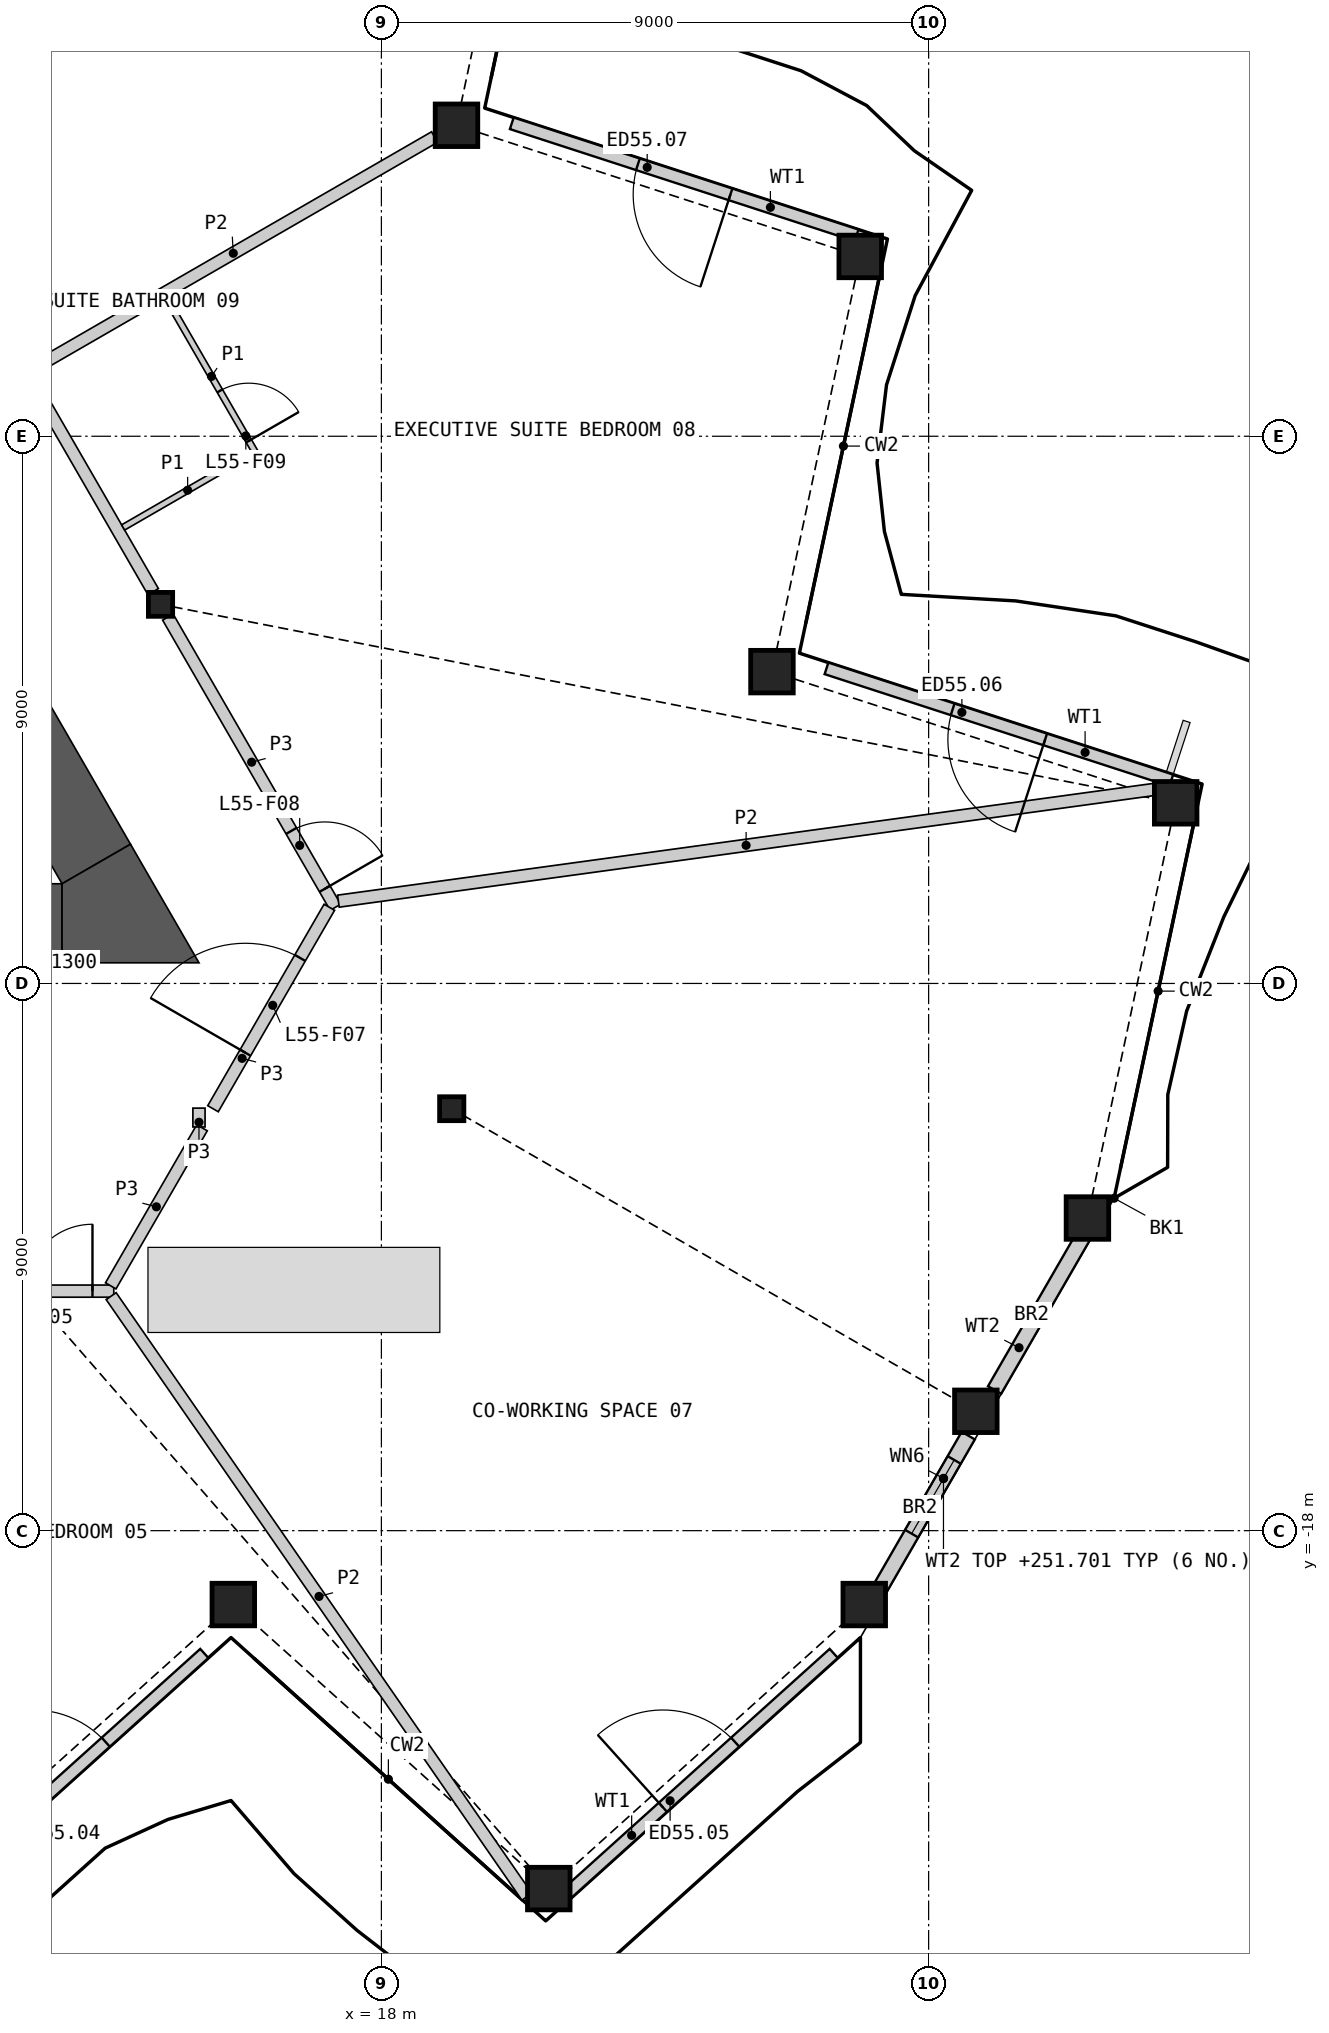
"""IFC4 building model, lengths in metres.
Left out: names, types, materials, properties, quantities, classifications, styles, units other than length and angle.
Written with IfcOpenShell. Run it as: python <this file> out.ifc"""

import sys

from ifc_helpers import new_model, si_unit, direction, frame, frame_2d, origin, origin_2d, place, context, subcontext, project, spatial, polyline, rectangle, hollow_rectangle, i_section, outline, extrude, element, fill, save


model = new_model("IFC4")
c1 = context("Model", 3, precision=1e-05, world=origin(), true_north=direction((0.0, 1.0)))
c2 = subcontext(c1, "Body", "Model", "MODEL_VIEW")
j1 = project(units=[si_unit("LENGTHUNIT", "METRE"), si_unit("PLANEANGLEUNIT", "RADIAN")], contexts=[c1])
p1 = place(None, origin())
s1 = spatial("IfcSite", under=j1, at=p1, CompositionType="ELEMENT")
p2 = place(p1, origin())
s2 = spatial("IfcBuilding", under=s1, at=p2, CompositionType="ELEMENT")
p3 = place(p2, frame((0.0, 0.0, 249.0)))
s3 = spatial("IfcBuildingStorey", under=s2, at=p3, CompositionType="ELEMENT", Elevation=249.0)
for number, where, z_axis, x_axis in (
    (1, (15.565, -19.215, 0.0), (0.0, 0.0, 1.0), (1.0, 0.0, 0.0)),
    (2, (20.753, -23.887, 0.0), (0.0, 0.0, 1.0), (1.0, 0.0, 0.0)),
    (3, (25.941, -19.215, 0.0), (0.0, 0.0, 1.0), (1.0, 0.0, 0.0)),
    (4, (27.776, -16.037, 0.0), (0.0, 0.0, 1.0), (1.0, 0.0, 0.0)),
    (5, (29.612, -12.858, 0.0), (0.0, 0.0, 1.0), (1.0, 0.0, 0.0)),
    (6, (31.063, -6.029, 0.0), (0.0, 0.0, 1.0), (1.0, 0.0, 0.0)),
    (7, (24.423, -3.872, 0.0), (0.0, 0.0, 1.0), (1.0, 0.0, 0.0)),
    (8, (25.875, 2.957, 0.0), (0.0, 0.0, 1.0), (1.0, 0.0, 0.0)),
    (9, (19.235, 5.115, 0.0), (0.0, 0.0, 1.0), (1.0, 0.0, 0.0)),
):
    element("IfcColumn", number, at=place(p3, frame(where, z_axis=z_axis, x_axis=x_axis)), inside=s3, PredefinedType="COLUMN", context=c2, shape_type="SweptSolid", body=[
        extrude(hollow_rectangle(XDim=0.7, YDim=0.7, WallThickness=0.045, at=origin_2d()), origin(), (0.0, 0.0, 1.0), 3.6),
    ])
for number, where, z_axis, x_axis in (
    (10, (19.157, -11.06, 0.0), (0.0, 0.0, 1.0), (1.0, 0.0, 0.0)),
    (11, (14.368, -2.765, 0.0), (0.0, 0.0, 1.0), (1.0, 0.0, 0.0)),
):
    element("IfcColumn", number, at=place(p3, frame(where, z_axis=z_axis, x_axis=x_axis)), inside=s3, PredefinedType="COLUMN", context=c2, shape_type="SweptSolid", body=[
        extrude(i_section(OverallWidth=0.399, OverallDepth=0.393, WebThickness=0.023, FlangeThickness=0.037, at=origin_2d()), origin(), (0.0, 0.0, 1.0), 3.6),
    ])
p4 = place(p3, frame((10.657, -24.009, 0.0), z_axis=(0.0, 0.0, 1.0), x_axis=(0.74315161366, 0.669123067241, 0.0)))
e12 = element("IfcWall", 12, at=p4, inside=s3, PredefinedType="SOLIDWALL", context=c2, shape_type="SweptSolid", body=[
    extrude(rectangle(XDim=5.963, YDim=0.2, at=frame_2d((2.981, 0.0))), origin(), (0.0, 0.0, 1.0), 2.701),
])
p5 = place(p4, frame((2.181, 0.0, 0.0)))
e13 = element("IfcOpeningElement", 13, at=p5, cuts=e12, PredefinedType="OPENING", context=c2, shape_type="SweptSolid", body=[
    extrude(rectangle(XDim=1.6, YDim=2.4, at=frame_2d((0.8, 1.2))), frame((0.0, 0.11, 0.0), z_axis=(0.0, -1.0, 0.0), x_axis=(1.0, 0.0, 0.0)), (0.0, 0.0, 1.0), 0.22),
])
p6 = place(p3, frame((21.008, -24.009, 0.0), z_axis=(0.0, 0.0, 1.0), x_axis=(0.743133280699, 0.669143427912, 0.0)))
e14 = element("IfcWall", 14, at=p6, inside=s3, PredefinedType="SOLIDWALL", context=c2, shape_type="SweptSolid", body=[
    extrude(rectangle(XDim=5.962, YDim=0.2, at=frame_2d((2.981, 0.0))), origin(), (0.0, 0.0, 1.0), 2.701),
])
p7 = place(p6, frame((2.181, 0.0, 0.0)))
e15 = element("IfcOpeningElement", 15, at=p7, cuts=e14, PredefinedType="OPENING", context=c2, shape_type="SweptSolid", body=[
    extrude(rectangle(XDim=1.6, YDim=2.4, at=frame_2d((0.8, 1.2))), frame((0.0, 0.11, 0.0), z_axis=(0.0, -1.0, 0.0), x_axis=(1.0, 0.0, 0.0)), (0.0, 0.0, 1.0), 0.22),
])
p8 = place(p3, frame((26.021, -19.262, 0.0), z_axis=(0.0, 0.0, 1.0), x_axis=(0.500026945261, 0.866009846372, 0.0)))
e16 = element("IfcWall", 16, at=p8, inside=s3, PredefinedType="SOLIDWALL", context=c2, shape_type="SweptSolid", body=[
    extrude(rectangle(XDim=3.262, YDim=0.25, at=frame_2d((1.631, 0.0))), origin(), (0.0, 0.0, 1.0), 2.701),
])
p9 = place(p8, frame((1.4, 0.0, 1.9)))
e17 = element("IfcOpeningElement", 17, at=p9, cuts=e16, PredefinedType="OPENING", context=c2, shape_type="SweptSolid", body=[
    extrude(rectangle(XDim=1.4, YDim=0.6, at=frame_2d((0.7, 0.3))), frame((0.0, 0.135, 0.0), z_axis=(0.0, -1.0, 0.0), x_axis=(1.0, 0.0, 0.0)), (0.0, 0.0, 1.0), 0.27),
])
p10 = place(p3, frame((28.085, -15.687, 0.0), z_axis=(0.0, 0.0, 1.0), x_axis=(0.499987708133, 0.866032500381, 0.0)))
e18 = element("IfcWall", 18, at=p10, inside=s3, PredefinedType="SOLIDWALL", context=c2, shape_type="SweptSolid", body=[
    extrude(rectangle(XDim=3.213, YDim=0.25, at=frame_2d((1.607, 0.0))), origin(), (0.0, 0.0, 1.0), 2.701),
])
p11 = place(p3, frame((30.991, -5.66, 0.0), z_axis=(0.0, 0.0, 1.0), x_axis=(-0.951055430656, 0.309020335608, 0.0)))
e19 = element("IfcWall", 19, at=p11, inside=s3, PredefinedType="SOLIDWALL", context=c2, shape_type="SweptSolid", body=[
    extrude(rectangle(XDim=5.962, YDim=0.2, at=frame_2d((2.981, 0.0))), origin(), (0.0, 0.0, 1.0), 2.701),
])
p12 = place(p11, frame((2.181, 0.0, 0.0)))
e20 = element("IfcOpeningElement", 20, at=p12, cuts=e19, PredefinedType="OPENING", context=c2, shape_type="SweptSolid", body=[
    extrude(rectangle(XDim=1.6, YDim=2.4, at=frame_2d((0.8, 1.2))), frame((0.0, 0.11, 0.0), z_axis=(0.0, -1.0, 0.0), x_axis=(1.0, 0.0, 0.0)), (0.0, 0.0, 1.0), 0.22),
])
p13 = place(p3, frame((25.815, 3.304, 0.0), z_axis=(0.0, 0.0, 1.0), x_axis=(-0.951055430656, 0.309020335608, 0.0)))
e21 = element("IfcWall", 21, at=p13, inside=s3, PredefinedType="SOLIDWALL", context=c2, shape_type="SweptSolid", body=[
    extrude(rectangle(XDim=5.962, YDim=0.2, at=frame_2d((2.981, 0.0))), origin(), (0.0, 0.0, 1.0), 2.701),
])
p14 = place(p13, frame((2.181, 0.0, 0.0)))
e22 = element("IfcOpeningElement", 22, at=p14, cuts=e21, PredefinedType="OPENING", context=c2, shape_type="SweptSolid", body=[
    extrude(rectangle(XDim=1.6, YDim=2.4, at=frame_2d((0.8, 1.2))), frame((0.0, 0.11, 0.0), z_axis=(0.0, -1.0, 0.0), x_axis=(1.0, 0.0, 0.0)), (0.0, 0.0, 1.0), 0.22),
])
p15 = place(p3, frame((8.488, -8.01, 0.0), z_axis=(0.0, 0.0, 1.0), x_axis=(1.0, 0.0, 0.0)))
e23 = element("IfcWall", 23, at=p15, inside=s3, PredefinedType="SHEAR", context=c2, shape_type="SweptSolid", body=[
    extrude(rectangle(XDim=4.26, YDim=1.3, at=frame_2d((2.13, 0.0))), origin(), (0.0, 0.0, 1.0), 3.25),
])
p16 = place(p3, frame((13.311, -7.035, 0.0), z_axis=(0.0, 0.0, 1.0), x_axis=(-0.500012574659, 0.86601814368, 0.0)))
e24 = element("IfcWall", 24, at=p16, inside=s3, PredefinedType="SHEAR", context=c2, shape_type="SweptSolid", body=[
    extrude(rectangle(XDim=4.298, YDim=1.3, at=frame_2d((2.149, 0.0))), origin(), (0.0, 0.0, 1.0), 3.25),
])
p17 = place(p3, origin())
e25 = element("IfcWall", 25, at=p17, inside=s3, PredefinedType="SHEAR", context=c2, shape_type="SweptSolid", body=[
    extrude(outline(polyline([(12.748, -8.66), (12.748, -7.36), (13.874, -6.71), (15.0, -8.66), (12.748, -8.66)])), origin(), (0.0, 0.0, 1.0), 3.25),
])
p18 = place(p3, frame((-13.599, -14.06, 0.0), z_axis=(0.0, 0.0, 1.0), x_axis=(1.0, 0.0, 0.0)))
e26 = element("IfcWall", 26, at=p18, inside=s3, PredefinedType="PARTITIONING", context=c2, shape_type="SweptSolid", body=[
    extrude(rectangle(XDim=27.198, YDim=0.2, at=frame_2d((13.599, 0.0))), origin(), (0.0, 0.0, 1.0), 3.25),
])
p19 = place(p18, frame((1.152, 0.0, 0.0)))
e27 = element("IfcOpeningElement", 27, at=p19, cuts=e26, PredefinedType="OPENING", context=c2, shape_type="SweptSolid", body=[
    extrude(rectangle(XDim=0.95, YDim=2.1, at=frame_2d((0.475, 1.05))), frame((0.0, 0.11, 0.0), z_axis=(0.0, -1.0, 0.0), x_axis=(1.0, 0.0, 0.0)), (0.0, 0.0, 1.0), 0.22),
])
p20 = place(p18, frame((16.311, 0.0, 0.0)))
e28 = element("IfcOpeningElement", 28, at=p20, cuts=e26, PredefinedType="OPENING", context=c2, shape_type="SweptSolid", body=[
    extrude(rectangle(XDim=1.1, YDim=2.1, at=frame_2d((0.55, 1.05))), frame((0.0, 0.11, 0.0), z_axis=(0.0, -1.0, 0.0), x_axis=(1.0, 0.0, 0.0)), (0.0, 0.0, 1.0), 0.22),
])
p21 = place(p18, frame((25.747, 0.0, 0.0)))
e29 = element("IfcOpeningElement", 29, at=p21, cuts=e26, PredefinedType="OPENING", context=c2, shape_type="SweptSolid", body=[
    extrude(rectangle(XDim=1.1, YDim=2.1, at=frame_2d((0.55, 1.05))), frame((0.0, 0.11, 0.0), z_axis=(0.0, -1.0, 0.0), x_axis=(1.0, 0.0, 0.0)), (0.0, 0.0, 1.0), 0.22),
])
p22 = place(p3, frame((9.699, 5.321, 0.0), z_axis=(0.0, 0.0, 1.0), x_axis=(0.49998193945, -0.866035830797, 0.0)))
e30 = element("IfcWall", 30, at=p22, inside=s3, PredefinedType="PARTITIONING", context=c2, shape_type="SweptSolid", body=[
    extrude(rectangle(XDim=9.094, YDim=0.2, at=frame_2d((4.547, 0.0))), origin(), (0.0, 0.0, 1.0), 3.25),
])
p23 = place(p3, frame((14.489, -2.975, 0.0), z_axis=(0.0, 0.0, 1.0), x_axis=(0.500017753321, -0.866015153657, 0.0)))
e31 = element("IfcWall", 31, at=p23, inside=s3, PredefinedType="PARTITIONING", context=c2, shape_type="SweptSolid", body=[
    extrude(rectangle(XDim=5.51, YDim=0.2, at=frame_2d((2.755, 0.0))), origin(), (0.0, 0.0, 1.0), 3.25),
])
p24 = place(p23, frame((4.06, 0.0, 0.0)))
e32 = element("IfcOpeningElement", 32, at=p24, cuts=e31, PredefinedType="OPENING", context=c2, shape_type="SweptSolid", body=[
    extrude(rectangle(XDim=1.1, YDim=2.1, at=frame_2d((0.55, 1.05))), frame((0.0, 0.11, 0.0), z_axis=(0.0, -1.0, 0.0), x_axis=(1.0, 0.0, 0.0)), (0.0, 0.0, 1.0), 0.22),
])
p25 = place(p3, frame((15.231, -11.06, 0.0), z_axis=(0.0, 0.0, 1.0), x_axis=(0.499961815444, 0.866047448526, 0.0)))
e33 = element("IfcWall", 33, at=p25, inside=s3, PredefinedType="PARTITIONING", context=c2, shape_type="SweptSolid", body=[
    extrude(rectangle(XDim=3.826, YDim=0.2, at=frame_2d((1.913, 0.0))), origin(), (0.0, 0.0, 1.0), 3.25),
])
p26 = place(p25, frame((1.064, 0.0, 0.0)))
e34 = element("IfcOpeningElement", 34, at=p26, cuts=e33, PredefinedType="OPENING", context=c2, shape_type="SweptSolid", body=[
    extrude(rectangle(XDim=1.8, YDim=2.1, at=frame_2d((0.9, 1.05))), frame((0.0, 0.11, 0.0), z_axis=(0.0, -1.0, 0.0), x_axis=(1.0, 0.0, 0.0)), (0.0, 0.0, 1.0), 0.22),
])
p27 = place(p3, frame((13.549, -13.974, 0.0), z_axis=(0.0, 0.0, 1.0), x_axis=(0.500048608389, 0.865997337899, 0.0)))
e35 = element("IfcWall", 35, at=p27, inside=s3, PredefinedType="PARTITIONING", context=c2, shape_type="SweptSolid", body=[
    extrude(rectangle(XDim=3.002, YDim=0.2, at=frame_2d((1.501, 0.0))), origin(), (0.0, 0.0, 1.0), 3.25),
])
p28 = place(p3, frame((15.0, -11.36, 0.0), z_axis=(0.0, 0.0, 1.0), x_axis=(0.0, 1.0, 0.0)))
e36 = element("IfcWall", 36, at=p28, inside=s3, PredefinedType="PARTITIONING", context=c2, shape_type="SweptSolid", body=[
    extrude(rectangle(XDim=0.31, YDim=0.2, at=frame_2d((0.155, 0.0))), origin(), (0.0, 0.0, 1.0), 3.25),
])
p29 = place(p3, frame((17.293, -7.646, 0.0), z_axis=(0.0, 0.0, 1.0), x_axis=(0.99075075074, 0.135694325259, 0.0)))
e37 = element("IfcWall", 37, at=p29, inside=s3, PredefinedType="PARTITIONING", context=c2, shape_type="SweptSolid", body=[
    extrude(rectangle(XDim=13.535, YDim=0.2, at=frame_2d((6.768, 0.0))), origin(), (0.0, 0.0, 1.0), 2.404),
])
p30 = place(p3, frame((13.556, -14.143, 0.0), z_axis=(0.0, 0.0, 1.0), x_axis=(0.56913494803, -0.82224413098, 0.0)))
e38 = element("IfcWall", 38, at=p30, inside=s3, PredefinedType="PARTITIONING", context=c2, shape_type="SweptSolid", body=[
    extrude(rectangle(XDim=12.014, YDim=0.2, at=frame_2d((6.007, 0.0))), origin(), (0.0, 0.0, 1.0), 2.404),
])
p31 = place(p3, frame((12.253, 1.098, 0.0), z_axis=(0.0, 0.0, 1.0), x_axis=(0.866026077102, 0.499998833779, 0.0)))
e39 = element("IfcWall", 39, at=p31, inside=s3, PredefinedType="PARTITIONING", context=c2, shape_type="SweptSolid", body=[
    extrude(rectangle(XDim=7.646, YDim=0.2, at=frame_2d((3.823, 0.0))), origin(), (0.0, 0.0, 1.0), 2.404),
])
p32 = place(p3, frame((14.468, 2.261, 0.0), z_axis=(0.0, 0.0, 1.0), x_axis=(0.500037662692, -0.866003658127, 0.0)))
e40 = element("IfcWall", 40, at=p32, inside=s3, PredefinedType="PARTITIONING", context=c2, shape_type="SweptSolid", body=[
    extrude(rectangle(XDim=2.95, YDim=0.1, at=frame_2d((1.475, 0.0))), origin(), (0.0, 0.0, 1.0), 2.404),
])
p33 = place(p32, frame((1.75, 0.0, 0.0)))
e41 = element("IfcOpeningElement", 41, at=p33, cuts=e40, PredefinedType="OPENING", context=c2, shape_type="SweptSolid", body=[
    extrude(rectangle(XDim=0.95, YDim=2.1, at=frame_2d((0.475, 1.05))), frame((0.0, 0.06, 0.0), z_axis=(0.0, -1.0, 0.0), x_axis=(1.0, 0.0, 0.0)), (0.0, 0.0, 1.0), 0.12),
])
p34 = place(p3, frame((13.753, -1.5, 0.0), z_axis=(0.0, 0.0, 1.0), x_axis=(0.866014668023, 0.500018594424, 0.0)))
e42 = element("IfcWall", 42, at=p34, inside=s3, PredefinedType="PARTITIONING", context=c2, shape_type="SweptSolid", body=[
    extrude(rectangle(XDim=2.45, YDim=0.1, at=frame_2d((1.225, 0.0))), origin(), (0.0, 0.0, 1.0), 2.404),
])
p35 = place(p5, origin())
e43 = element("IfcDoor", 43, at=p35, inside=s3, OperationType="DOUBLE_DOOR_SINGLE_SWING", PredefinedType="DOOR", context=c2, shape_type="SweptSolid", body=[
    extrude(rectangle(XDim=1.6, YDim=2.4, at=frame_2d((0.8, 1.2))), frame((0.0, 0.025, 0.0), z_axis=(0.0, -1.0, 0.0), x_axis=(1.0, 0.0, 0.0)), (0.0, 0.0, 1.0), 0.05),
])
fill(e13, e43)
p36 = place(p7, origin())
e44 = element("IfcDoor", 44, at=p36, inside=s3, OperationType="DOUBLE_DOOR_SINGLE_SWING", PredefinedType="DOOR", context=c2, shape_type="SweptSolid", body=[
    extrude(rectangle(XDim=1.6, YDim=2.4, at=frame_2d((0.8, 1.2))), frame((0.0, 0.025, 0.0), z_axis=(0.0, -1.0, 0.0), x_axis=(1.0, 0.0, 0.0)), (0.0, 0.0, 1.0), 0.05),
])
fill(e15, e44)
p37 = place(p9, origin())
e45 = element("IfcWindow", 45, at=p37, inside=s3, PartitioningType="SINGLE_PANEL", PredefinedType="WINDOW", context=c2, shape_type="SweptSolid", body=[
    extrude(rectangle(XDim=1.4, YDim=0.6, at=frame_2d((0.7, 0.3))), frame((0.0, 0.03, 0.0), z_axis=(0.0, -1.0, 0.0), x_axis=(1.0, 0.0, 0.0)), (0.0, 0.0, 1.0), 0.06),
])
fill(e17, e45)
p38 = place(p12, origin())
e46 = element("IfcDoor", 46, at=p38, inside=s3, OperationType="DOUBLE_DOOR_SINGLE_SWING", PredefinedType="DOOR", context=c2, shape_type="SweptSolid", body=[
    extrude(rectangle(XDim=1.6, YDim=2.4, at=frame_2d((0.8, 1.2))), frame((0.0, 0.025, 0.0), z_axis=(0.0, -1.0, 0.0), x_axis=(1.0, 0.0, 0.0)), (0.0, 0.0, 1.0), 0.05),
])
fill(e20, e46)
p39 = place(p14, origin())
e47 = element("IfcDoor", 47, at=p39, inside=s3, OperationType="DOUBLE_DOOR_SINGLE_SWING", PredefinedType="DOOR", context=c2, shape_type="SweptSolid", body=[
    extrude(rectangle(XDim=1.6, YDim=2.4, at=frame_2d((0.8, 1.2))), frame((0.0, 0.025, 0.0), z_axis=(0.0, -1.0, 0.0), x_axis=(1.0, 0.0, 0.0)), (0.0, 0.0, 1.0), 0.05),
])
fill(e22, e47)
p40 = place(p21, origin())
e48 = element("IfcDoor", 48, at=p40, inside=s3, OperationType="SINGLE_SWING_RIGHT", PredefinedType="DOOR", context=c2, shape_type="SweptSolid", body=[
    extrude(rectangle(XDim=1.1, YDim=2.1, at=frame_2d((0.55, 1.05))), frame((0.0, 0.025, 0.0), z_axis=(0.0, -1.0, 0.0), x_axis=(1.0, 0.0, 0.0)), (0.0, 0.0, 1.0), 0.05),
])
fill(e29, e48)
p41 = place(p26, origin())
e49 = element("IfcDoor", 49, at=p41, inside=s3, OperationType="DOUBLE_DOOR_SINGLE_SWING", PredefinedType="DOOR", context=c2, shape_type="SweptSolid", body=[
    extrude(rectangle(XDim=1.8, YDim=2.1, at=frame_2d((0.9, 1.05))), frame((0.0, 0.025, 0.0), z_axis=(0.0, -1.0, 0.0), x_axis=(1.0, 0.0, 0.0)), (0.0, 0.0, 1.0), 0.05),
])
fill(e34, e49)
p42 = place(p24, origin())
e50 = element("IfcDoor", 50, at=p42, inside=s3, OperationType="SINGLE_SWING_RIGHT", PredefinedType="DOOR", context=c2, shape_type="SweptSolid", body=[
    extrude(rectangle(XDim=1.1, YDim=2.1, at=frame_2d((0.55, 1.05))), frame((0.0, 0.025, 0.0), z_axis=(0.0, -1.0, 0.0), x_axis=(1.0, 0.0, 0.0)), (0.0, 0.0, 1.0), 0.05),
])
fill(e32, e50)
p43 = place(p33, origin())
e51 = element("IfcDoor", 51, at=p43, inside=s3, OperationType="SINGLE_SWING_RIGHT", PredefinedType="DOOR", context=c2, shape_type="SweptSolid", body=[
    extrude(rectangle(XDim=0.95, YDim=2.1, at=frame_2d((0.475, 1.05))), frame((0.0, 0.025, 0.0), z_axis=(0.0, -1.0, 0.0), x_axis=(1.0, 0.0, 0.0)), (0.0, 0.0, 1.0), 0.05),
])
fill(e41, e51)
save(model, sys.argv[1])
